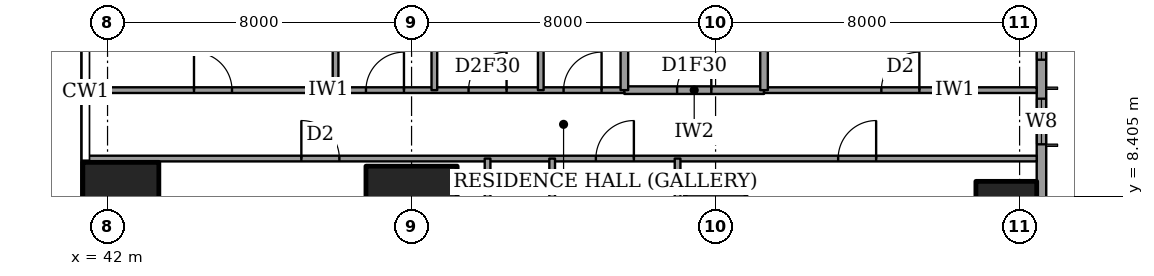
"""IFC4 building model, lengths in metres.
Left out: names, types, materials, properties, quantities, classifications, styles, units other than length and angle.
Written with IfcOpenShell. Run it as: python <this file> out.ifc"""

import sys

from ifc_helpers import new_model, si_unit, direction, frame, frame_2d, origin, origin_2d, place, context, subcontext, project, spatial, rectangle, extrude, element, fill, save


model = new_model("IFC4")
c1 = context("Model", 3, precision=1e-05, world=origin(), true_north=direction((0.0, 1.0)))
c2 = subcontext(c1, "Body", "Model", "MODEL_VIEW")
j1 = project(units=[si_unit("LENGTHUNIT", "METRE"), si_unit("PLANEANGLEUNIT", "RADIAN")], contexts=[c1])
p1 = place(None, origin())
s1 = spatial("IfcSite", under=j1, at=p1, CompositionType="ELEMENT")
p2 = place(p1, origin())
s2 = spatial("IfcBuilding", under=s1, at=p2, CompositionType="ELEMENT")
p3 = place(p2, frame((0.0, 0.0, 255.6)))
s3 = spatial("IfcBuildingStorey", under=s2, at=p3, CompositionType="ELEMENT", Elevation=255.6)
p4 = place(p3, frame((42.35, 8.0, 0.0), z_axis=(0.0, 0.0, 1.0), x_axis=(1.0, 0.0, 0.0)))
e1 = element("IfcColumn", 1, at=p4, inside=s3, PredefinedType="COLUMN", context=c2, shape_type="SweptSolid", body=[
    extrude(rectangle(XDim=2.0, YDim=2.6, at=origin_2d()), origin(), (0.0, 0.0, 1.0), 3.6),
])
p5 = place(p3, frame((50.0, 8.0, 0.0), z_axis=(0.0, 0.0, 1.0), x_axis=(1.0, 0.0, 0.0)))
e2 = element("IfcColumn", 2, at=p5, inside=s3, PredefinedType="COLUMN", context=c2, shape_type="SweptSolid", body=[
    extrude(rectangle(XDim=2.4, YDim=2.4, at=origin_2d()), origin(), (0.0, 0.0, 1.0), 3.6),
])
for number, where, z_axis, x_axis in (
    (3, (58.0, 8.0, 0.0), (0.0, 0.0, 1.0), (1.0, 0.0, 0.0)),
    (4, (65.65, 8.0, 0.0), (0.0, 0.0, 1.0), (1.0, 0.0, 0.0)),
):
    element("IfcColumn", number, at=place(p3, frame(where, z_axis=z_axis, x_axis=x_axis)), inside=s3, PredefinedType="COLUMN", context=c2, shape_type="SweptSolid", body=[
        extrude(rectangle(XDim=1.6, YDim=1.6, at=origin_2d()), origin(), (0.0, 0.0, 1.0), 3.6),
    ])
p6 = place(p3, frame((66.575, 3.175, 0.0), z_axis=(0.0, 0.0, 1.0), x_axis=(0.0, 1.0, 0.0)))
e5 = element("IfcWall", 5, at=p6, inside=s3, PredefinedType="SOLIDWALL", context=c2, shape_type="SweptSolid", body=[
    extrude(rectangle(XDim=41.65, YDim=0.25, at=frame_2d((20.825, 0.0))), origin(), (0.0, 0.0, 1.0), 3.6),
])
p7 = place(p6, frame((0.875, 0.0, 0.6)))
e6 = element("IfcOpeningElement", 6, at=p7, cuts=e5, PredefinedType="OPENING", context=c2, shape_type="SweptSolid", body=[
    extrude(rectangle(XDim=2.4, YDim=2.0, at=frame_2d((1.2, 1.0))), frame((0.0, 0.135, 0.0), z_axis=(0.0, -1.0, 0.0), x_axis=(1.0, 0.0, 0.0)), (0.0, 0.0, 1.0), 0.27),
])
p8 = place(p6, frame((6.6, 0.0, 0.6)))
e7 = element("IfcOpeningElement", 7, at=p8, cuts=e5, PredefinedType="OPENING", context=c2, shape_type="SweptSolid", body=[
    extrude(rectangle(XDim=1.2, YDim=2.0, at=frame_2d((0.6, 1.0))), frame((0.0, 0.135, 0.0), z_axis=(0.0, -1.0, 0.0), x_axis=(1.0, 0.0, 0.0)), (0.0, 0.0, 1.0), 0.27),
])
p9 = place(p6, frame((8.825, 0.0, 0.6)))
e8 = element("IfcOpeningElement", 8, at=p9, cuts=e5, PredefinedType="OPENING", context=c2, shape_type="SweptSolid", body=[
    extrude(rectangle(XDim=2.4, YDim=2.0, at=frame_2d((1.2, 1.0))), frame((0.0, 0.135, 0.0), z_axis=(0.0, -1.0, 0.0), x_axis=(1.0, 0.0, 0.0)), (0.0, 0.0, 1.0), 0.27),
])
p10 = place(p6, frame((15.725, 0.0, 0.6)))
e9 = element("IfcOpeningElement", 9, at=p10, cuts=e5, PredefinedType="OPENING", context=c2, shape_type="SweptSolid", body=[
    extrude(rectangle(XDim=2.4, YDim=2.0, at=frame_2d((1.2, 1.0))), frame((0.0, 0.135, 0.0), z_axis=(0.0, -1.0, 0.0), x_axis=(1.0, 0.0, 0.0)), (0.0, 0.0, 1.0), 0.27),
])
p11 = place(p6, frame((23.625, 0.0, 0.6)))
e10 = element("IfcOpeningElement", 10, at=p11, cuts=e5, PredefinedType="OPENING", context=c2, shape_type="SweptSolid", body=[
    extrude(rectangle(XDim=2.4, YDim=2.0, at=frame_2d((1.2, 1.0))), frame((0.0, 0.135, 0.0), z_axis=(0.0, -1.0, 0.0), x_axis=(1.0, 0.0, 0.0)), (0.0, 0.0, 1.0), 0.27),
])
p12 = place(p6, frame((30.725, 0.0, 0.6)))
e11 = element("IfcOpeningElement", 11, at=p12, cuts=e5, PredefinedType="OPENING", context=c2, shape_type="SweptSolid", body=[
    extrude(rectangle(XDim=2.4, YDim=2.0, at=frame_2d((1.2, 1.0))), frame((0.0, 0.135, 0.0), z_axis=(0.0, -1.0, 0.0), x_axis=(1.0, 0.0, 0.0)), (0.0, 0.0, 1.0), 0.27),
])
p13 = place(p6, frame((34.525, 0.0, 0.6)))
e12 = element("IfcOpeningElement", 12, at=p13, cuts=e5, PredefinedType="OPENING", context=c2, shape_type="SweptSolid", body=[
    extrude(rectangle(XDim=1.2, YDim=2.0, at=frame_2d((0.6, 1.0))), frame((0.0, 0.135, 0.0), z_axis=(0.0, -1.0, 0.0), x_axis=(1.0, 0.0, 0.0)), (0.0, 0.0, 1.0), 0.27),
])
p14 = place(p6, frame((38.375, 0.0, 0.6)))
e13 = element("IfcOpeningElement", 13, at=p14, cuts=e5, PredefinedType="OPENING", context=c2, shape_type="SweptSolid", body=[
    extrude(rectangle(XDim=2.4, YDim=2.0, at=frame_2d((1.2, 1.0))), frame((0.0, 0.135, 0.0), z_axis=(0.0, -1.0, 0.0), x_axis=(1.0, 0.0, 0.0)), (0.0, 0.0, 1.0), 0.27),
])
p15 = place(p3, frame((41.439, 9.4, 0.0), z_axis=(0.0, 0.0, 1.0), x_axis=(1.0, 0.0, 0.0)))
e14 = element("IfcWall", 14, at=p15, inside=s3, PredefinedType="PARTITIONING", context=c2, shape_type="SweptSolid", body=[
    extrude(rectangle(XDim=25.011, YDim=0.15, at=frame_2d((12.505, 0.0))), origin(), (0.0, 0.0, 1.0), 3.35),
])
p16 = place(p15, frame((19.786, 0.0, 0.0)))
e15 = element("IfcOpeningElement", 15, at=p16, cuts=e14, PredefinedType="OPENING", context=c2, shape_type="SweptSolid", body=[
    extrude(rectangle(XDim=1.0, YDim=2.1, at=frame_2d((0.5, 1.05))), frame((0.0, 0.085, 0.0), z_axis=(0.0, -1.0, 0.0), x_axis=(1.0, 0.0, 0.0)), (0.0, 0.0, 1.0), 0.17),
])
p17 = place(p15, frame((13.411, 0.0, 0.0)))
e16 = element("IfcOpeningElement", 16, at=p17, cuts=e14, PredefinedType="OPENING", context=c2, shape_type="SweptSolid", body=[
    extrude(rectangle(XDim=1.0, YDim=2.1, at=frame_2d((0.5, 1.05))), frame((0.0, 0.085, 0.0), z_axis=(0.0, -1.0, 0.0), x_axis=(1.0, 0.0, 0.0)), (0.0, 0.0, 1.0), 0.17),
])
p18 = place(p15, frame((5.661, 0.0, 0.0)))
e17 = element("IfcOpeningElement", 17, at=p18, cuts=e14, PredefinedType="OPENING", context=c2, shape_type="SweptSolid", body=[
    extrude(rectangle(XDim=1.0, YDim=2.1, at=frame_2d((0.5, 1.05))), frame((0.0, 0.085, 0.0), z_axis=(0.0, -1.0, 0.0), x_axis=(1.0, 0.0, 0.0)), (0.0, 0.0, 1.0), 0.17),
])
p19 = place(p3, frame((55.6, 11.2, 0.0), z_axis=(0.0, 0.0, 1.0), x_axis=(1.0, 0.0, 0.0)))
e18 = element("IfcWall", 18, at=p19, inside=s3, PredefinedType="PARTITIONING", context=c2, shape_type="SweptSolid", body=[
    extrude(rectangle(XDim=3.675, YDim=0.2, at=frame_2d((1.837, 0.0))), origin(), (0.0, 0.0, 1.0), 3.35),
])
p20 = place(p19, frame((1.387, 0.0, 0.0)))
e19 = element("IfcOpeningElement", 19, at=p20, cuts=e18, PredefinedType="OPENING", context=c2, shape_type="SweptSolid", body=[
    extrude(rectangle(XDim=0.9, YDim=2.1, at=frame_2d((0.45, 1.05))), frame((0.0, 0.11, 0.0), z_axis=(0.0, -1.0, 0.0), x_axis=(1.0, 0.0, 0.0)), (0.0, 0.0, 1.0), 0.22),
])
p21 = place(p3, frame((41.439, 11.2, 0.0), z_axis=(0.0, 0.0, 1.0), x_axis=(1.0, 0.0, 0.0)))
e20 = element("IfcWall", 20, at=p21, inside=s3, PredefinedType="PARTITIONING", context=c2, shape_type="SweptSolid", body=[
    extrude(rectangle(XDim=14.161, YDim=0.15, at=frame_2d((7.081, 0.0))), origin(), (0.0, 0.0, 1.0), 3.35),
])
p22 = place(p21, frame((12.561, 0.0, 0.0)))
e21 = element("IfcOpeningElement", 21, at=p22, cuts=e20, PredefinedType="OPENING", context=c2, shape_type="SweptSolid", body=[
    extrude(rectangle(XDim=1.0, YDim=2.1, at=frame_2d((0.5, 1.05))), frame((0.0, 0.085, 0.0), z_axis=(0.0, -1.0, 0.0), x_axis=(1.0, 0.0, 0.0)), (0.0, 0.0, 1.0), 0.17),
])
p23 = place(p21, frame((10.061, 0.0, 0.0)))
e22 = element("IfcOpeningElement", 22, at=p23, cuts=e20, PredefinedType="OPENING", context=c2, shape_type="SweptSolid", body=[
    extrude(rectangle(XDim=1.0, YDim=2.1, at=frame_2d((0.5, 1.05))), frame((0.0, 0.085, 0.0), z_axis=(0.0, -1.0, 0.0), x_axis=(1.0, 0.0, 0.0)), (0.0, 0.0, 1.0), 0.17),
])
p24 = place(p21, frame((7.361, 0.0, 0.0)))
e23 = element("IfcOpeningElement", 23, at=p24, cuts=e20, PredefinedType="OPENING", context=c2, shape_type="SweptSolid", body=[
    extrude(rectangle(XDim=1.0, YDim=2.1, at=frame_2d((0.5, 1.05))), frame((0.0, 0.085, 0.0), z_axis=(0.0, -1.0, 0.0), x_axis=(1.0, 0.0, 0.0)), (0.0, 0.0, 1.0), 0.17),
])
p25 = place(p21, frame((2.836, 0.0, 0.0)))
e24 = element("IfcOpeningElement", 24, at=p25, cuts=e20, PredefinedType="OPENING", context=c2, shape_type="SweptSolid", body=[
    extrude(rectangle(XDim=1.0, YDim=2.1, at=frame_2d((0.5, 1.05))), frame((0.0, 0.085, 0.0), z_axis=(0.0, -1.0, 0.0), x_axis=(1.0, 0.0, 0.0)), (0.0, 0.0, 1.0), 0.17),
])
p26 = place(p3, frame((59.275, 11.2, 0.0), z_axis=(0.0, 0.0, 1.0), x_axis=(1.0, 0.0, 0.0)))
e25 = element("IfcWall", 25, at=p26, inside=s3, PredefinedType="PARTITIONING", context=c2, shape_type="SweptSolid", body=[
    extrude(rectangle(XDim=7.175, YDim=0.15, at=frame_2d((3.587, 0.0))), origin(), (0.0, 0.0, 1.0), 3.35),
])
p27 = place(p26, frame((3.087, 0.0, 0.0)))
e26 = element("IfcOpeningElement", 26, at=p27, cuts=e25, PredefinedType="OPENING", context=c2, shape_type="SweptSolid", body=[
    extrude(rectangle(XDim=1.0, YDim=2.1, at=frame_2d((0.5, 1.05))), frame((0.0, 0.085, 0.0), z_axis=(0.0, -1.0, 0.0), x_axis=(1.0, 0.0, 0.0)), (0.0, 0.0, 1.0), 0.17),
])
p28 = place(p3, frame((48.0, 11.2, 0.0), z_axis=(0.0, 0.0, 1.0), x_axis=(0.0, 1.0, 0.0)))
e27 = element("IfcWall", 27, at=p28, inside=s3, PredefinedType="PARTITIONING", context=c2, shape_type="SweptSolid", body=[
    extrude(rectangle(XDim=6.8, YDim=0.15, at=frame_2d((3.4, 0.0))), origin(), (0.0, 0.0, 1.0), 3.35),
])
p29 = place(p3, frame((50.6, 11.2, 0.0), z_axis=(0.0, 0.0, 1.0), x_axis=(0.0, 1.0, 0.0)))
e28 = element("IfcWall", 28, at=p29, inside=s3, PredefinedType="PARTITIONING", context=c2, shape_type="SweptSolid", body=[
    extrude(rectangle(XDim=3.6, YDim=0.15, at=frame_2d((1.8, 0.0))), origin(), (0.0, 0.0, 1.0), 3.35),
])
p30 = place(p3, frame((52.0, -0.45, 0.0), z_axis=(0.0, 0.0, 1.0), x_axis=(0.0, 1.0, 0.0)))
e29 = element("IfcWall", 29, at=p30, inside=s3, PredefinedType="PARTITIONING", context=c2, shape_type="SweptSolid", body=[
    extrude(rectangle(XDim=9.85, YDim=0.15, at=frame_2d((4.925, 0.0))), origin(), (0.0, 0.0, 1.0), 3.35),
])
p31 = place(p3, frame((53.4, 11.2, 0.0), z_axis=(0.0, 0.0, 1.0), x_axis=(0.0, 1.0, 0.0)))
e30 = element("IfcWall", 30, at=p31, inside=s3, PredefinedType="PARTITIONING", context=c2, shape_type="SweptSolid", body=[
    extrude(rectangle(XDim=6.8, YDim=0.15, at=frame_2d((3.4, 0.0))), origin(), (0.0, 0.0, 1.0), 3.35),
])
p32 = place(p3, frame((53.7, -0.45, 0.0), z_axis=(0.0, 0.0, 1.0), x_axis=(0.0, 1.0, 0.0)))
e31 = element("IfcWall", 31, at=p32, inside=s3, PredefinedType="PARTITIONING", context=c2, shape_type="SweptSolid", body=[
    extrude(rectangle(XDim=9.85, YDim=0.15, at=frame_2d((4.925, 0.0))), origin(), (0.0, 0.0, 1.0), 3.35),
])
p33 = place(p32, frame((4.475, 0.0, 0.0)))
e32 = element("IfcOpeningElement", 32, at=p33, cuts=e31, PredefinedType="OPENING", context=c2, shape_type="SweptSolid", body=[
    extrude(rectangle(XDim=0.9, YDim=2.1, at=frame_2d((0.45, 1.05))), frame((0.0, 0.085, 0.0), z_axis=(0.0, -1.0, 0.0), x_axis=(1.0, 0.0, 0.0)), (0.0, 0.0, 1.0), 0.17),
])
p34 = place(p3, frame((55.6, 11.2, 0.0), z_axis=(0.0, 0.0, 1.0), x_axis=(0.0, 1.0, 0.0)))
e33 = element("IfcWall", 33, at=p34, inside=s3, PredefinedType="PARTITIONING", context=c2, shape_type="SweptSolid", body=[
    extrude(rectangle(XDim=3.4, YDim=0.2, at=frame_2d((1.7, 0.0))), origin(), (0.0, 0.0, 1.0), 3.35),
])
p35 = place(p3, frame((57.0, -0.45, 0.0), z_axis=(0.0, 0.0, 1.0), x_axis=(0.0, 1.0, 0.0)))
e34 = element("IfcWall", 34, at=p35, inside=s3, PredefinedType="PARTITIONING", context=c2, shape_type="SweptSolid", body=[
    extrude(rectangle(XDim=9.85, YDim=0.15, at=frame_2d((4.925, 0.0))), origin(), (0.0, 0.0, 1.0), 3.35),
])
p36 = place(p3, frame((59.275, 11.2, 0.0), z_axis=(0.0, 0.0, 1.0), x_axis=(0.0, 1.0, 0.0)))
e35 = element("IfcWall", 35, at=p36, inside=s3, PredefinedType="PARTITIONING", context=c2, shape_type="SweptSolid", body=[
    extrude(rectangle(XDim=3.4, YDim=0.2, at=frame_2d((1.7, 0.0))), origin(), (0.0, 0.0, 1.0), 3.35),
])
p37 = place(p8, origin())
e36 = element("IfcWindow", 36, at=p37, inside=s3, PartitioningType="SINGLE_PANEL", PredefinedType="WINDOW", context=c2, shape_type="SweptSolid", body=[
    extrude(rectangle(XDim=1.2, YDim=2.0, at=frame_2d((0.6, 1.0))), frame((0.0, 0.03, 0.0), z_axis=(0.0, -1.0, 0.0), x_axis=(1.0, 0.0, 0.0)), (0.0, 0.0, 1.0), 0.06),
])
fill(e7, e36)
p38 = place(p9, origin())
e37 = element("IfcWindow", 37, at=p38, inside=s3, PartitioningType="SINGLE_PANEL", PredefinedType="WINDOW", context=c2, shape_type="SweptSolid", body=[
    extrude(rectangle(XDim=2.4, YDim=2.0, at=frame_2d((1.2, 1.0))), frame((0.0, 0.03, 0.0), z_axis=(0.0, -1.0, 0.0), x_axis=(1.0, 0.0, 0.0)), (0.0, 0.0, 1.0), 0.06),
])
fill(e8, e37)
p39 = place(p16, origin())
e38 = element("IfcDoor", 38, at=p39, inside=s3, OperationType="SINGLE_SWING_LEFT", PredefinedType="DOOR", context=c2, shape_type="SweptSolid", body=[
    extrude(rectangle(XDim=1.0, YDim=2.1, at=frame_2d((0.5, 1.05))), frame((0.0, 0.025, 0.0), z_axis=(0.0, -1.0, 0.0), x_axis=(1.0, 0.0, 0.0)), (0.0, 0.0, 1.0), 0.05),
])
fill(e15, e38)
p40 = place(p17, origin())
e39 = element("IfcDoor", 39, at=p40, inside=s3, OperationType="SINGLE_SWING_LEFT", PredefinedType="DOOR", context=c2, shape_type="SweptSolid", body=[
    extrude(rectangle(XDim=1.0, YDim=2.1, at=frame_2d((0.5, 1.05))), frame((0.0, 0.025, 0.0), z_axis=(0.0, -1.0, 0.0), x_axis=(1.0, 0.0, 0.0)), (0.0, 0.0, 1.0), 0.05),
])
fill(e16, e39)
p41 = place(p18, origin())
e40 = element("IfcDoor", 40, at=p41, inside=s3, OperationType="SINGLE_SWING_RIGHT", PredefinedType="DOOR", context=c2, shape_type="SweptSolid", body=[
    extrude(rectangle(XDim=1.0, YDim=2.1, at=frame_2d((0.5, 1.05))), frame((0.0, 0.025, 0.0), z_axis=(0.0, -1.0, 0.0), x_axis=(1.0, 0.0, 0.0)), (0.0, 0.0, 1.0), 0.05),
])
fill(e17, e40)
p42 = place(p22, origin())
e41 = element("IfcDoor", 41, at=p42, inside=s3, OperationType="SINGLE_SWING_LEFT", PredefinedType="DOOR", context=c2, shape_type="SweptSolid", body=[
    extrude(rectangle(XDim=1.0, YDim=2.1, at=frame_2d((0.5, 1.05))), frame((0.0, 0.025, 0.0), z_axis=(0.0, -1.0, 0.0), x_axis=(1.0, 0.0, 0.0)), (0.0, 0.0, 1.0), 0.05),
])
fill(e21, e41)
p43 = place(p27, origin())
e42 = element("IfcDoor", 42, at=p43, inside=s3, OperationType="SINGLE_SWING_LEFT", PredefinedType="DOOR", context=c2, shape_type="SweptSolid", body=[
    extrude(rectangle(XDim=1.0, YDim=2.1, at=frame_2d((0.5, 1.05))), frame((0.0, 0.025, 0.0), z_axis=(0.0, -1.0, 0.0), x_axis=(1.0, 0.0, 0.0)), (0.0, 0.0, 1.0), 0.05),
])
fill(e26, e42)
p44 = place(p20, origin())
e43 = element("IfcDoor", 43, at=p44, inside=s3, OperationType="SINGLE_SWING_LEFT", PredefinedType="DOOR", context=c2, shape_type="SweptSolid", body=[
    extrude(rectangle(XDim=0.9, YDim=2.1, at=frame_2d((0.45, 1.05))), frame((0.0, 0.025, 0.0), z_axis=(0.0, -1.0, 0.0), x_axis=(1.0, 0.0, 0.0)), (0.0, 0.0, 1.0), 0.05),
])
fill(e19, e43)
p45 = place(p23, origin())
e44 = element("IfcDoor", 44, at=p45, inside=s3, OperationType="SINGLE_SWING_LEFT", PredefinedType="DOOR", context=c2, shape_type="SweptSolid", body=[
    extrude(rectangle(XDim=1.0, YDim=2.1, at=frame_2d((0.5, 1.05))), frame((0.0, 0.025, 0.0), z_axis=(0.0, -1.0, 0.0), x_axis=(1.0, 0.0, 0.0)), (0.0, 0.0, 1.0), 0.05),
])
fill(e22, e44)
p46 = place(p24, origin())
e45 = element("IfcDoor", 45, at=p46, inside=s3, OperationType="SINGLE_SWING_LEFT", PredefinedType="DOOR", context=c2, shape_type="SweptSolid", body=[
    extrude(rectangle(XDim=1.0, YDim=2.1, at=frame_2d((0.5, 1.05))), frame((0.0, 0.025, 0.0), z_axis=(0.0, -1.0, 0.0), x_axis=(1.0, 0.0, 0.0)), (0.0, 0.0, 1.0), 0.05),
])
fill(e23, e45)
p47 = place(p25, origin())
e46 = element("IfcDoor", 46, at=p47, inside=s3, OperationType="SINGLE_SWING_RIGHT", PredefinedType="DOOR", context=c2, shape_type="SweptSolid", body=[
    extrude(rectangle(XDim=1.0, YDim=2.1, at=frame_2d((0.5, 1.05))), frame((0.0, 0.025, 0.0), z_axis=(0.0, -1.0, 0.0), x_axis=(1.0, 0.0, 0.0)), (0.0, 0.0, 1.0), 0.05),
])
fill(e24, e46)
save(model, sys.argv[1])
